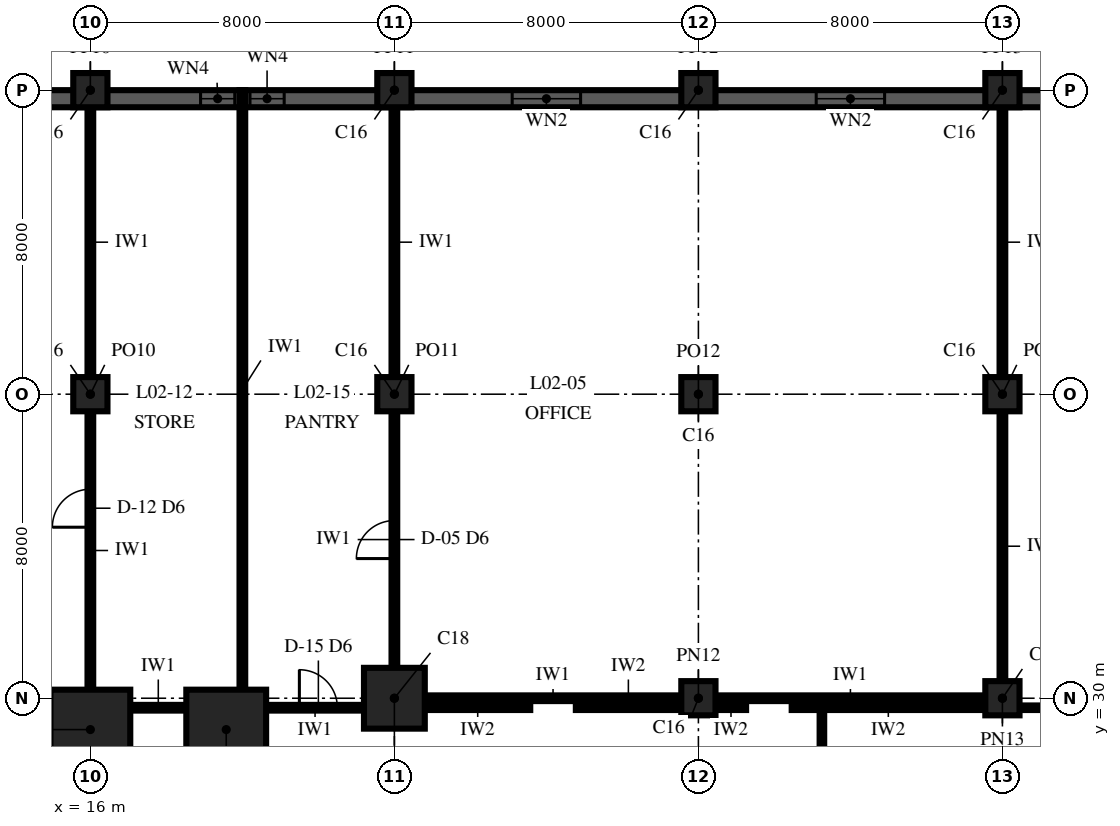
"""IFC4 building model, lengths in metres.
Left out: names, types, materials, properties, quantities, classifications, styles, units other than length and angle.
Written with IfcOpenShell. Run it as: python <this file> out.ifc"""

import sys

from ifc_helpers import new_model, si_unit, direction, frame, frame_2d, origin, origin_2d, place, context, subcontext, project, spatial, rectangle, extrude, element, fill, save


model = new_model("IFC4")
c1 = context("Model", 3, precision=1e-05, world=origin(), true_north=direction((0.0, 1.0)))
c2 = subcontext(c1, "Body", "Model", "MODEL_VIEW")
j1 = project(units=[si_unit("LENGTHUNIT", "METRE"), si_unit("PLANEANGLEUNIT", "RADIAN")], contexts=[c1])
p1 = place(None, origin())
s1 = spatial("IfcSite", under=j1, at=p1, CompositionType="ELEMENT")
p2 = place(p1, origin())
s2 = spatial("IfcBuilding", under=s1, at=p2, CompositionType="ELEMENT")
p3 = place(p2, frame((0.0, 0.0, 12.0)))
s3 = spatial("IfcBuildingStorey", under=s2, at=p3, CompositionType="ELEMENT", Elevation=12.0)
for number, where, z_axis, x_axis in (
    (1, (19.575, 29.175, 0.0), (0.0, 0.0, 1.0), (-1.0, 0.0, 0.0)),
    (2, (16.0, 29.175, 0.0), (0.0, 0.0, 1.0), (-1.0, 0.0, 0.0)),
):
    element("IfcColumn", number, at=place(p3, frame(where, z_axis=z_axis, x_axis=x_axis)), inside=s3, PredefinedType="COLUMN", context=c2, shape_type="SweptSolid", body=[
        extrude(rectangle(XDim=2.1, YDim=2.1, at=origin_2d()), origin(), (0.0, 0.0, 1.0), 7.0),
    ])
for number, where, z_axis, x_axis in (
    (3, (16.0, 38.0, 0.0), (0.0, 0.0, 1.0), (1.0, 0.0, 0.0)),
    (4, (16.0, 46.0, 0.0), (0.0, 0.0, 1.0), (1.0, 0.0, 0.0)),
):
    element("IfcColumn", number, at=place(p3, frame(where, z_axis=z_axis, x_axis=x_axis)), inside=s3, PredefinedType="COLUMN", context=c2, shape_type="SweptSolid", body=[
        extrude(rectangle(XDim=0.9, YDim=0.9, at=origin_2d()), origin(), (0.0, 0.0, 1.0), 7.0),
    ])
p4 = place(p3, frame((24.0, 30.0, 0.0), z_axis=(0.0, 0.0, 1.0), x_axis=(1.0, 0.0, 0.0)))
e5 = element("IfcColumn", 5, at=p4, inside=s3, PredefinedType="COLUMN", context=c2, shape_type="SweptSolid", body=[
    extrude(rectangle(XDim=1.6, YDim=1.6, at=origin_2d()), origin(), (0.0, 0.0, 1.0), 7.0),
])
for number, where, z_axis, x_axis in (
    (6, (24.0, 38.0, 0.0), (0.0, 0.0, 1.0), (1.0, 0.0, 0.0)),
    (7, (24.0, 46.0, 0.0), (0.0, 0.0, 1.0), (1.0, 0.0, 0.0)),
    (8, (32.0, 30.0, 0.0), (0.0, 0.0, 1.0), (1.0, 0.0, 0.0)),
    (9, (32.0, 38.0, 0.0), (0.0, 0.0, 1.0), (1.0, 0.0, 0.0)),
    (10, (32.0, 46.0, 0.0), (0.0, 0.0, 1.0), (1.0, 0.0, 0.0)),
    (11, (40.0, 30.0, 0.0), (0.0, 0.0, 1.0), (1.0, 0.0, 0.0)),
    (12, (40.0, 38.0, 0.0), (0.0, 0.0, 1.0), (1.0, 0.0, 0.0)),
    (13, (40.0, 46.0, 0.0), (0.0, 0.0, 1.0), (1.0, 0.0, 0.0)),
):
    element("IfcColumn", number, at=place(p3, frame(where, z_axis=z_axis, x_axis=x_axis)), inside=s3, PredefinedType="COLUMN", context=c2, shape_type="SweptSolid", body=[
        extrude(rectangle(XDim=0.9, YDim=0.9, at=origin_2d()), origin(), (0.0, 0.0, 1.0), 7.0),
    ])
p5 = place(p3, frame((56.0, 45.775, 0.0), z_axis=(0.0, 0.0, 1.0), x_axis=(-1.0, 0.0, 0.0)))
e14 = element("IfcWall", 14, at=p5, inside=s3, PredefinedType="SOLIDWALL", context=c2, shape_type="SweptSolid", body=[
    extrude(rectangle(XDim=90.0, YDim=0.45, at=frame_2d((45.0, 0.0))), origin(), (0.0, 0.0, 1.0), 7.0),
])
p6 = place(p5, frame((3.1, 0.0, 1.0)))
e15 = element("IfcOpeningElement", 15, at=p6, cuts=e14, PredefinedType="OPENING", context=c2, shape_type="SweptSolid", body=[
    extrude(rectangle(XDim=1.8, YDim=3.0, at=frame_2d((0.9, 1.5))), frame((0.0, 0.24, 0.0), z_axis=(0.0, -1.0, 0.0), x_axis=(1.0, 0.0, 0.0)), (0.0, 0.0, 1.0), 0.48),
])
p7 = place(p5, frame((11.1, 0.0, 1.0)))
e16 = element("IfcOpeningElement", 16, at=p7, cuts=e14, PredefinedType="OPENING", context=c2, shape_type="SweptSolid", body=[
    extrude(rectangle(XDim=1.8, YDim=3.0, at=frame_2d((0.9, 1.5))), frame((0.0, 0.24, 0.0), z_axis=(0.0, -1.0, 0.0), x_axis=(1.0, 0.0, 0.0)), (0.0, 0.0, 1.0), 0.48),
])
p8 = place(p5, frame((19.1, 0.0, 1.0)))
e17 = element("IfcOpeningElement", 17, at=p8, cuts=e14, PredefinedType="OPENING", context=c2, shape_type="SweptSolid", body=[
    extrude(rectangle(XDim=1.8, YDim=3.0, at=frame_2d((0.9, 1.5))), frame((0.0, 0.24, 0.0), z_axis=(0.0, -1.0, 0.0), x_axis=(1.0, 0.0, 0.0)), (0.0, 0.0, 1.0), 0.48),
])
p9 = place(p5, frame((27.1, 0.0, 1.0)))
e18 = element("IfcOpeningElement", 18, at=p9, cuts=e14, PredefinedType="OPENING", context=c2, shape_type="SweptSolid", body=[
    extrude(rectangle(XDim=1.8, YDim=3.0, at=frame_2d((0.9, 1.5))), frame((0.0, 0.24, 0.0), z_axis=(0.0, -1.0, 0.0), x_axis=(1.0, 0.0, 0.0)), (0.0, 0.0, 1.0), 0.48),
])
p10 = place(p5, frame((34.9, 0.0, 1.0)))
e19 = element("IfcOpeningElement", 19, at=p10, cuts=e14, PredefinedType="OPENING", context=c2, shape_type="SweptSolid", body=[
    extrude(rectangle(XDim=0.9, YDim=3.0, at=frame_2d((0.45, 1.5))), frame((0.0, 0.24, 0.0), z_axis=(0.0, -1.0, 0.0), x_axis=(1.0, 0.0, 0.0)), (0.0, 0.0, 1.0), 0.48),
])
p11 = place(p5, frame((36.2, 0.0, 1.0)))
e20 = element("IfcOpeningElement", 20, at=p11, cuts=e14, PredefinedType="OPENING", context=c2, shape_type="SweptSolid", body=[
    extrude(rectangle(XDim=0.9, YDim=3.0, at=frame_2d((0.45, 1.5))), frame((0.0, 0.24, 0.0), z_axis=(0.0, -1.0, 0.0), x_axis=(1.0, 0.0, 0.0)), (0.0, 0.0, 1.0), 0.48),
])
p12 = place(p5, frame((43.1, 0.0, 1.0)))
e21 = element("IfcOpeningElement", 21, at=p12, cuts=e14, PredefinedType="OPENING", context=c2, shape_type="SweptSolid", body=[
    extrude(rectangle(XDim=1.8, YDim=3.0, at=frame_2d((0.9, 1.5))), frame((0.0, 0.24, 0.0), z_axis=(0.0, -1.0, 0.0), x_axis=(1.0, 0.0, 0.0)), (0.0, 0.0, 1.0), 0.48),
])
p13 = place(p5, frame((51.1, 0.0, 1.0)))
e22 = element("IfcOpeningElement", 22, at=p13, cuts=e14, PredefinedType="OPENING", context=c2, shape_type="SweptSolid", body=[
    extrude(rectangle(XDim=1.8, YDim=3.0, at=frame_2d((0.9, 1.5))), frame((0.0, 0.24, 0.0), z_axis=(0.0, -1.0, 0.0), x_axis=(1.0, 0.0, 0.0)), (0.0, 0.0, 1.0), 0.48),
])
p14 = place(p5, frame((59.1, 0.0, 1.0)))
e23 = element("IfcOpeningElement", 23, at=p14, cuts=e14, PredefinedType="OPENING", context=c2, shape_type="SweptSolid", body=[
    extrude(rectangle(XDim=1.8, YDim=3.0, at=frame_2d((0.9, 1.5))), frame((0.0, 0.24, 0.0), z_axis=(0.0, -1.0, 0.0), x_axis=(1.0, 0.0, 0.0)), (0.0, 0.0, 1.0), 0.48),
])
p15 = place(p5, frame((67.1, 0.0, 1.0)))
e24 = element("IfcOpeningElement", 24, at=p15, cuts=e14, PredefinedType="OPENING", context=c2, shape_type="SweptSolid", body=[
    extrude(rectangle(XDim=1.8, YDim=3.0, at=frame_2d((0.9, 1.5))), frame((0.0, 0.24, 0.0), z_axis=(0.0, -1.0, 0.0), x_axis=(1.0, 0.0, 0.0)), (0.0, 0.0, 1.0), 0.48),
])
p16 = place(p5, frame((75.1, 0.0, 1.0)))
e25 = element("IfcOpeningElement", 25, at=p16, cuts=e14, PredefinedType="OPENING", context=c2, shape_type="SweptSolid", body=[
    extrude(rectangle(XDim=1.8, YDim=3.0, at=frame_2d((0.9, 1.5))), frame((0.0, 0.24, 0.0), z_axis=(0.0, -1.0, 0.0), x_axis=(1.0, 0.0, 0.0)), (0.0, 0.0, 1.0), 0.48),
])
p17 = place(p5, frame((83.1, 0.0, 1.0)))
e26 = element("IfcOpeningElement", 26, at=p17, cuts=e14, PredefinedType="OPENING", context=c2, shape_type="SweptSolid", body=[
    extrude(rectangle(XDim=1.8, YDim=3.0, at=frame_2d((0.9, 1.5))), frame((0.0, 0.24, 0.0), z_axis=(0.0, -1.0, 0.0), x_axis=(1.0, 0.0, 0.0)), (0.0, 0.0, 1.0), 0.48),
])
p18 = place(p3, frame((16.0, 30.235, 0.0), z_axis=(0.0, 0.0, 1.0), x_axis=(0.0, 1.0, 0.0)))
e27 = element("IfcWall", 27, at=p18, inside=s3, PredefinedType="PARTITIONING", context=c2, shape_type="SweptSolid", body=[
    extrude(rectangle(XDim=7.305, YDim=0.15, at=frame_2d((3.652, 0.0))), origin(), (0.0, 0.0, 1.0), 6.7),
])
p19 = place(p18, frame((4.265, 0.0, 0.0)))
e28 = element("IfcOpeningElement", 28, at=p19, cuts=e27, PredefinedType="OPENING", context=c2, shape_type="SweptSolid", body=[
    extrude(rectangle(XDim=1.0, YDim=2.1, at=frame_2d((0.5, 1.05))), frame((0.0, 0.09, 0.0), z_axis=(0.0, -1.0, 0.0), x_axis=(1.0, 0.0, 0.0)), (0.0, 0.0, 1.0), 0.18),
])
p20 = place(p3, frame((16.0, 38.46, 0.0), z_axis=(0.0, 0.0, 1.0), x_axis=(0.0, 1.0, 0.0)))
e29 = element("IfcWall", 29, at=p20, inside=s3, PredefinedType="PARTITIONING", context=c2, shape_type="SweptSolid", body=[
    extrude(rectangle(XDim=7.08, YDim=0.15, at=frame_2d((3.54, 0.0))), origin(), (0.0, 0.0, 1.0), 6.05),
])
p21 = place(p3, frame((20.0, 30.235, 0.0), z_axis=(0.0, 0.0, 1.0), x_axis=(0.0, 1.0, 0.0)))
e30 = element("IfcWall", 30, at=p21, inside=s3, PredefinedType="PARTITIONING", context=c2, shape_type="SweptSolid", body=[
    extrude(rectangle(XDim=15.765, YDim=0.15, at=frame_2d((7.882, 0.0))), origin(), (0.0, 0.0, 1.0), 6.7),
])
p22 = place(p3, frame((24.0, 30.81, 0.0), z_axis=(0.0, 0.0, 1.0), x_axis=(0.0, 1.0, 0.0)))
e31 = element("IfcWall", 31, at=p22, inside=s3, PredefinedType="PARTITIONING", context=c2, shape_type="SweptSolid", body=[
    extrude(rectangle(XDim=6.73, YDim=0.15, at=frame_2d((3.365, 0.0))), origin(), (0.0, 0.0, 1.0), 6.05),
])
p23 = place(p22, frame((2.865, 0.0, 0.0)))
e32 = element("IfcOpeningElement", 32, at=p23, cuts=e31, PredefinedType="OPENING", context=c2, shape_type="SweptSolid", body=[
    extrude(rectangle(XDim=1.0, YDim=2.1, at=frame_2d((0.5, 1.05))), frame((0.0, 0.09, 0.0), z_axis=(0.0, -1.0, 0.0), x_axis=(1.0, 0.0, 0.0)), (0.0, 0.0, 1.0), 0.18),
])
p24 = place(p3, frame((24.0, 38.46, 0.0), z_axis=(0.0, 0.0, 1.0), x_axis=(0.0, 1.0, 0.0)))
e33 = element("IfcWall", 33, at=p24, inside=s3, PredefinedType="PARTITIONING", context=c2, shape_type="SweptSolid", body=[
    extrude(rectangle(XDim=7.08, YDim=0.15, at=frame_2d((3.54, 0.0))), origin(), (0.0, 0.0, 1.0), 6.05),
])
p25 = place(p3, frame((35.25, 12.6, 0.0), z_axis=(0.0, 0.0, 1.0), x_axis=(0.0, 1.0, 0.0)))
e34 = element("IfcWall", 34, at=p25, inside=s3, PredefinedType="PARTITIONING", context=c2, shape_type="SweptSolid", body=[
    extrude(rectangle(XDim=17.15, YDim=0.12, at=frame_2d((8.575, 0.0))), origin(), (0.0, 0.0, 1.0), 6.7),
])
for number, where, z_axis, x_axis in (
    (35, (40.0, 30.46, 0.0), (0.0, 0.0, 1.0), (0.0, 1.0, 0.0)),
    (36, (40.0, 38.46, 0.0), (0.0, 0.0, 1.0), (0.0, 1.0, 0.0)),
):
    element("IfcWall", number, at=place(p3, frame(where, z_axis=z_axis, x_axis=x_axis)), inside=s3, PredefinedType="PARTITIONING", context=c2, shape_type="SweptSolid", body=[
        extrude(rectangle(XDim=7.08, YDim=0.15, at=frame_2d((3.54, 0.0))), origin(), (0.0, 0.0, 1.0), 6.05),
    ])
p26 = place(p3, frame((17.06, 29.75, 0.0), z_axis=(0.0, 0.0, 1.0), x_axis=(1.0, 0.0, 0.0)))
e37 = element("IfcWall", 37, at=p26, inside=s3, PredefinedType="PARTITIONING", context=c2, shape_type="SweptSolid", body=[
    extrude(rectangle(XDim=1.455, YDim=0.15, at=frame_2d((0.728, 0.0))), origin(), (0.0, 0.0, 1.0), 6.7),
])
p27 = place(p3, frame((20.635, 29.75, 0.0), z_axis=(0.0, 0.0, 1.0), x_axis=(1.0, 0.0, 0.0)))
e38 = element("IfcWall", 38, at=p27, inside=s3, PredefinedType="PARTITIONING", context=c2, shape_type="SweptSolid", body=[
    extrude(rectangle(XDim=2.555, YDim=0.15, at=frame_2d((1.277, 0.0))), origin(), (0.0, 0.0, 1.0), 6.7),
])
p28 = place(p27, frame((0.865, 0.0, 0.0)))
e39 = element("IfcOpeningElement", 39, at=p28, cuts=e38, PredefinedType="OPENING", context=c2, shape_type="SweptSolid", body=[
    extrude(rectangle(XDim=1.0, YDim=2.1, at=frame_2d((0.5, 1.05))), frame((0.0, 0.09, 0.0), z_axis=(0.0, -1.0, 0.0), x_axis=(1.0, 0.0, 0.0)), (0.0, 0.0, 1.0), 0.18),
])
p29 = place(p3, frame((24.81, 29.75, 0.0), z_axis=(0.0, 0.0, 1.0), x_axis=(1.0, 0.0, 0.0)))
e40 = element("IfcWall", 40, at=p29, inside=s3, PredefinedType="PARTITIONING", context=c2, shape_type="SweptSolid", body=[
    extrude(rectangle(XDim=2.765, YDim=0.12, at=frame_2d((1.382, 0.0))), origin(), (0.0, 0.0, 1.0), 6.05),
])
p30 = place(p3, frame((28.775, 29.75, 0.0), z_axis=(0.0, 0.0, 1.0), x_axis=(1.0, 0.0, 0.0)))
e41 = element("IfcWall", 41, at=p30, inside=s3, PredefinedType="PARTITIONING", context=c2, shape_type="SweptSolid", body=[
    extrude(rectangle(XDim=2.765, YDim=0.12, at=frame_2d((1.383, 0.0))), origin(), (0.0, 0.0, 1.0), 6.05),
])
p31 = place(p3, frame((32.46, 29.75, 0.0), z_axis=(0.0, 0.0, 1.0), x_axis=(1.0, 0.0, 0.0)))
e42 = element("IfcWall", 42, at=p31, inside=s3, PredefinedType="PARTITIONING", context=c2, shape_type="SweptSolid", body=[
    extrude(rectangle(XDim=0.795, YDim=0.12, at=frame_2d((0.397, 0.0))), origin(), (0.0, 0.0, 1.0), 6.05),
])
p32 = place(p3, frame((34.455, 29.75, 0.0), z_axis=(0.0, 0.0, 1.0), x_axis=(1.0, 0.0, 0.0)))
e43 = element("IfcWall", 43, at=p32, inside=s3, PredefinedType="PARTITIONING", context=c2, shape_type="SweptSolid", body=[
    extrude(rectangle(XDim=5.085, YDim=0.12, at=frame_2d((2.542, 0.0))), origin(), (0.0, 0.0, 1.0), 6.05),
])
p33 = place(p3, frame((40.46, 29.75, 0.0), z_axis=(0.0, 0.0, 1.0), x_axis=(1.0, 0.0, 0.0)))
e44 = element("IfcWall", 44, at=p33, inside=s3, PredefinedType="PARTITIONING", context=c2, shape_type="SweptSolid", body=[
    extrude(rectangle(XDim=1.107, YDim=0.12, at=frame_2d((0.554, 0.0))), origin(), (0.0, 0.0, 1.0), 6.7),
])
p34 = place(p3, frame((24.81, 30.0, 0.0), z_axis=(0.0, 0.0, 1.0), x_axis=(1.0, 0.0, 0.0)))
e45 = element("IfcWall", 45, at=p34, inside=s3, PredefinedType="PARTITIONING", context=c2, shape_type="SweptSolid", body=[
    extrude(rectangle(XDim=6.73, YDim=0.15, at=frame_2d((3.365, 0.0))), origin(), (0.0, 0.0, 1.0), 6.05),
])
p35 = place(p3, frame((32.46, 30.0, 0.0), z_axis=(0.0, 0.0, 1.0), x_axis=(1.0, 0.0, 0.0)))
e46 = element("IfcWall", 46, at=p35, inside=s3, PredefinedType="PARTITIONING", context=c2, shape_type="SweptSolid", body=[
    extrude(rectangle(XDim=7.08, YDim=0.15, at=frame_2d((3.54, 0.0))), origin(), (0.0, 0.0, 1.0), 6.05),
])
p36 = place(p8, origin())
e47 = element("IfcWindow", 47, at=p36, inside=s3, PartitioningType="SINGLE_PANEL", PredefinedType="WINDOW", context=c2, shape_type="SweptSolid", body=[
    extrude(rectangle(XDim=1.8, YDim=3.0, at=frame_2d((0.9, 1.5))), frame((0.0, 0.03, 0.0), z_axis=(0.0, -1.0, 0.0), x_axis=(1.0, 0.0, 0.0)), (0.0, 0.0, 1.0), 0.06),
])
fill(e17, e47)
p37 = place(p9, origin())
e48 = element("IfcWindow", 48, at=p37, inside=s3, PartitioningType="SINGLE_PANEL", PredefinedType="WINDOW", context=c2, shape_type="SweptSolid", body=[
    extrude(rectangle(XDim=1.8, YDim=3.0, at=frame_2d((0.9, 1.5))), frame((0.0, 0.03, 0.0), z_axis=(0.0, -1.0, 0.0), x_axis=(1.0, 0.0, 0.0)), (0.0, 0.0, 1.0), 0.06),
])
fill(e18, e48)
p38 = place(p10, origin())
e49 = element("IfcWindow", 49, at=p38, inside=s3, PartitioningType="SINGLE_PANEL", PredefinedType="WINDOW", context=c2, shape_type="SweptSolid", body=[
    extrude(rectangle(XDim=0.9, YDim=3.0, at=frame_2d((0.45, 1.5))), frame((0.0, 0.03, 0.0), z_axis=(0.0, -1.0, 0.0), x_axis=(1.0, 0.0, 0.0)), (0.0, 0.0, 1.0), 0.06),
])
fill(e19, e49)
p39 = place(p11, origin())
e50 = element("IfcWindow", 50, at=p39, inside=s3, PartitioningType="SINGLE_PANEL", PredefinedType="WINDOW", context=c2, shape_type="SweptSolid", body=[
    extrude(rectangle(XDim=0.9, YDim=3.0, at=frame_2d((0.45, 1.5))), frame((0.0, 0.03, 0.0), z_axis=(0.0, -1.0, 0.0), x_axis=(1.0, 0.0, 0.0)), (0.0, 0.0, 1.0), 0.06),
])
fill(e20, e50)
p40 = place(p19, origin())
e51 = element("IfcDoor", 51, at=p40, inside=s3, OperationType="SINGLE_SWING_LEFT", PredefinedType="DOOR", context=c2, shape_type="SweptSolid", body=[
    extrude(rectangle(XDim=1.0, YDim=2.1, at=frame_2d((0.5, 1.05))), frame((0.0, 0.075, 0.0), z_axis=(0.0, -1.0, 0.0), x_axis=(1.0, 0.0, 0.0)), (0.0, 0.0, 1.0), 0.149),
])
fill(e28, e51)
p41 = place(p23, origin())
e52 = element("IfcDoor", 52, at=p41, inside=s3, OperationType="SINGLE_SWING_LEFT", PredefinedType="DOOR", context=c2, shape_type="SweptSolid", body=[
    extrude(rectangle(XDim=1.0, YDim=2.1, at=frame_2d((0.5, 1.05))), frame((0.0, 0.075, 0.0), z_axis=(0.0, -1.0, 0.0), x_axis=(1.0, 0.0, 0.0)), (0.0, 0.0, 1.0), 0.149),
])
fill(e32, e52)
p42 = place(p28, origin())
e53 = element("IfcDoor", 53, at=p42, inside=s3, OperationType="SINGLE_SWING_LEFT", PredefinedType="DOOR", context=c2, shape_type="SweptSolid", body=[
    extrude(rectangle(XDim=1.0, YDim=2.1, at=frame_2d((0.5, 1.05))), frame((0.0, 0.075, 0.0), z_axis=(0.0, -1.0, 0.0), x_axis=(1.0, 0.0, 0.0)), (0.0, 0.0, 1.0), 0.149),
])
fill(e39, e53)
save(model, sys.argv[1])
